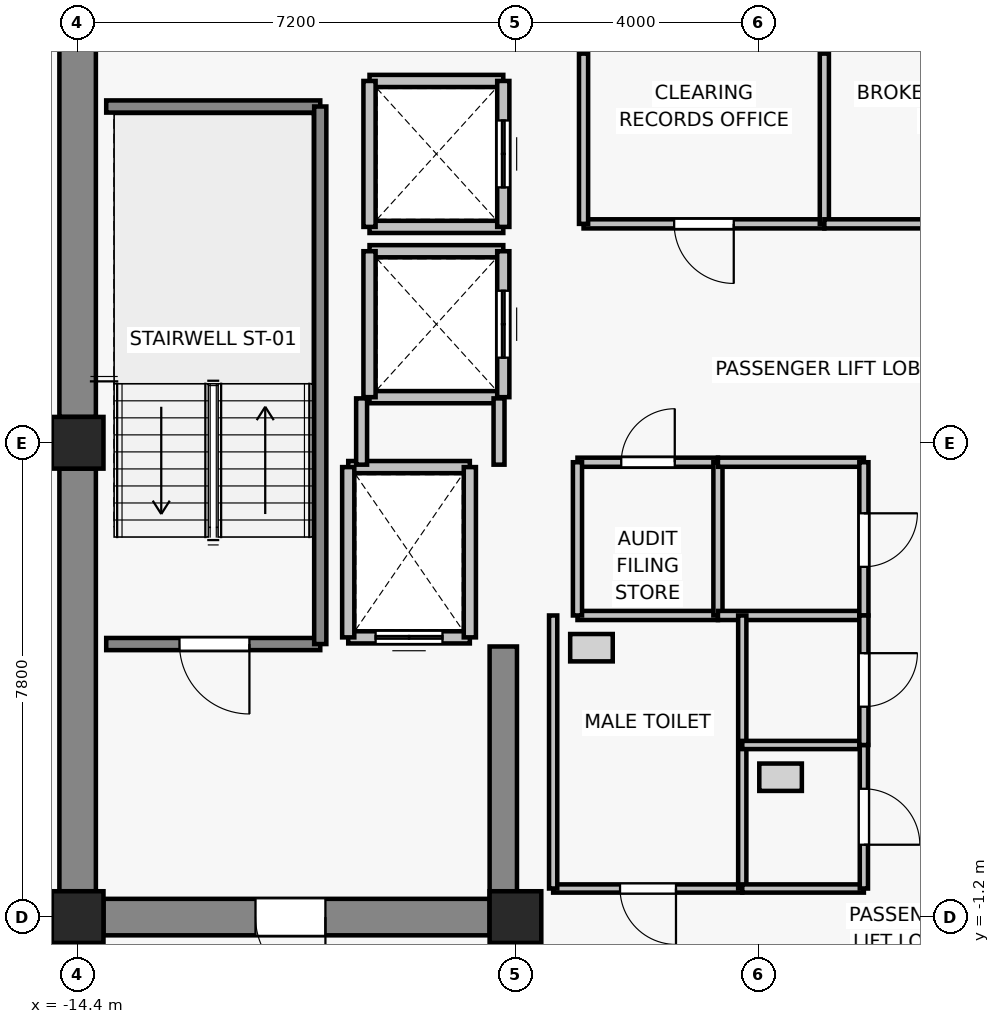
"""IFC4 building model, lengths in metres.
Left out: names, types, materials, properties, quantities, classifications, styles, units other than length and angle.
Written with IfcOpenShell. Run it as: python <this file> out.ifc"""

import sys

from ifc_helpers import new_model, si_unit, direction, frame, frame_2d, origin, origin_2d, place, context, subcontext, project, spatial, rectangle, extrude, source, transform, mapped, element, fill, save


model = new_model("IFC4")
c1 = context("Model", 3, precision=1e-05, world=origin(), true_north=direction((0.0, 1.0)))
c2 = subcontext(c1, "Body", "Model", "MODEL_VIEW")
j1 = project(units=[si_unit("LENGTHUNIT", "METRE"), si_unit("PLANEANGLEUNIT", "RADIAN")], contexts=[c1])
p1 = place(None, origin())
s1 = spatial("IfcSite", under=j1, at=p1, CompositionType="ELEMENT")
p2 = place(p1, origin())
s2 = spatial("IfcBuilding", under=s1, at=p2, CompositionType="ELEMENT")
p3 = place(p2, frame((0.0, 0.0, 222.1)))
s3 = spatial("IfcBuildingStorey", under=s2, at=p3, CompositionType="ELEMENT", Elevation=222.1)
for number, where, z_axis, x_axis in (
    (1, (-14.4, -1.2, 0.0), (0.0, 0.0, 1.0), (1.0, 0.0, 0.0)),
    (2, (-7.2, -1.2, 0.0), (0.0, 0.0, 1.0), (1.0, 0.0, 0.0)),
    (3, (-14.4, 6.6, 0.0), (0.0, 0.0, 1.0), (1.0, 0.0, 0.0)),
):
    element("IfcColumn", number, at=place(p3, frame(where, z_axis=z_axis, x_axis=x_axis)), inside=s3, PredefinedType="COLUMN", context=c2, shape_type="SweptSolid", body=[
        extrude(rectangle(XDim=0.85, YDim=0.85, at=origin_2d()), origin(), (0.0, 0.0, 1.0), 3.3),
    ])
p4 = place(p3, frame((-14.4, -0.775, 0.0), z_axis=(0.0, 0.0, 1.0), x_axis=(0.0, 1.0, 0.0)))
e4 = element("IfcWall", 4, at=p4, inside=s3, PredefinedType="SHEAR", context=c2, shape_type="SweptSolid", body=[
    extrude(rectangle(XDim=6.95, YDim=0.6, at=frame_2d((3.475, 0.0))), origin(), (0.0, 0.0, 1.0), 3.075),
])
p5 = place(p3, frame((-14.4, 7.025, 0.0), z_axis=(0.0, 0.0, 1.0), x_axis=(0.0, 1.0, 0.0)))
e5 = element("IfcWall", 5, at=p5, inside=s3, PredefinedType="SHEAR", context=c2, shape_type="SweptSolid", body=[
    extrude(rectangle(XDim=6.05, YDim=0.6, at=frame_2d((3.025, 0.0))), origin(), (0.0, 0.0, 1.0), 3.075),
])
p6 = place(p3, frame((-7.625, -1.2, 0.0), z_axis=(0.0, 0.0, 1.0), x_axis=(-1.0, 0.0, 0.0)))
e6 = element("IfcWall", 6, at=p6, inside=s3, PredefinedType="SHEAR", context=c2, shape_type="SweptSolid", body=[
    extrude(rectangle(XDim=6.35, YDim=0.6, at=frame_2d((3.175, 0.0))), origin(), (0.0, 0.0, 1.0), 3.075),
])
p7 = place(p6, frame((2.7, 0.0, 0.0)))
e7 = element("IfcOpeningElement", 7, at=p7, cuts=e6, PredefinedType="OPENING", context=c2, shape_type="SweptSolid", body=[
    extrude(rectangle(XDim=1.15, YDim=2.15, at=frame_2d((0.575, 1.075))), frame((0.0, 0.31, 0.0), z_axis=(0.0, -1.0, 0.0), x_axis=(1.0, 0.0, 0.0)), (0.0, 0.0, 1.0), 0.62),
])
p8 = place(p3, frame((-7.4, -0.9, 0.0), z_axis=(0.0, 0.0, 1.0), x_axis=(0.0, 1.0, 0.0)))
e8 = element("IfcWall", 8, at=p8, inside=s3, PredefinedType="SHEAR", context=c2, shape_type="SweptSolid", body=[
    extrude(rectangle(XDim=4.15, YDim=0.45, at=frame_2d((2.075, 0.0))), origin(), (0.0, 0.0, 1.0), 3.075),
])
p9 = place(p3, frame((-7.95, 3.4, 0.0), z_axis=(0.0, 0.0, 1.0), x_axis=(-1.0, 0.0, 0.0)))
e9 = element("IfcWall", 9, at=p9, inside=s3, PredefinedType="SOLIDWALL", context=c2, shape_type="SweptSolid", body=[
    extrude(rectangle(XDim=2.0, YDim=0.2, at=frame_2d((1.0, 0.0))), origin(), (0.0, 0.0, 1.0), 3.075),
])
p10 = place(p9, frame((0.45, 0.0, 0.0)))
e10 = element("IfcOpeningElement", 10, at=p10, cuts=e9, PredefinedType="OPENING", context=c2, shape_type="SweptSolid", body=[
    extrude(rectangle(XDim=1.1, YDim=2.2, at=frame_2d((0.55, 1.1))), frame((0.0, 0.11, 0.0), z_axis=(0.0, -1.0, 0.0), x_axis=(1.0, 0.0, 0.0)), (0.0, 0.0, 1.0), 0.22),
])
p11 = place(p3, frame((-9.95, 6.2, 0.0), z_axis=(0.0, 0.0, 1.0), x_axis=(1.0, 0.0, 0.0)))
e11 = element("IfcWall", 11, at=p11, inside=s3, PredefinedType="SOLIDWALL", context=c2, shape_type="SweptSolid", body=[
    extrude(rectangle(XDim=2.0, YDim=0.2, at=frame_2d((1.0, 0.0))), origin(), (0.0, 0.0, 1.0), 3.075),
])
for number, where, z_axis, x_axis in (
    (12, (-9.95, 3.4, 0.0), (0.0, 0.0, 1.0), (0.0, 1.0, 0.0)),
    (13, (-7.95, 6.2, 0.0), (0.0, 0.0, 1.0), (0.0, -1.0, 0.0)),
):
    element("IfcWall", number, at=place(p3, frame(where, z_axis=z_axis, x_axis=x_axis)), inside=s3, PredefinedType="SOLIDWALL", context=c2, shape_type="SweptSolid", body=[
        extrude(rectangle(XDim=2.8, YDim=0.2, at=frame_2d((1.4, 0.0))), origin(), (0.0, 0.0, 1.0), 3.075),
    ])
for number, where, z_axis, x_axis in (
    (14, (-7.4, 7.35, 0.0), (0.0, 0.0, 1.0), (-1.0, 0.0, 0.0)),
    (15, (-9.6, 9.75, 0.0), (0.0, 0.0, 1.0), (1.0, 0.0, 0.0)),
):
    element("IfcWall", number, at=place(p3, frame(where, z_axis=z_axis, x_axis=x_axis)), inside=s3, PredefinedType="SOLIDWALL", context=c2, shape_type="SweptSolid", body=[
        extrude(rectangle(XDim=2.2, YDim=0.2, at=frame_2d((1.1, 0.0))), origin(), (0.0, 0.0, 1.0), 2.615),
    ])
p12 = place(p3, frame((-9.6, 7.35, 0.0), z_axis=(0.0, 0.0, 1.0), x_axis=(0.0, 1.0, 0.0)))
e16 = element("IfcWall", 16, at=p12, inside=s3, PredefinedType="SOLIDWALL", context=c2, shape_type="SweptSolid", body=[
    extrude(rectangle(XDim=2.4, YDim=0.2, at=frame_2d((1.2, 0.0))), origin(), (0.0, 0.0, 1.0), 3.075),
])
p13 = place(p3, frame((-7.4, 9.75, 0.0), z_axis=(0.0, 0.0, 1.0), x_axis=(0.0, -1.0, 0.0)))
e17 = element("IfcWall", 17, at=p13, inside=s3, PredefinedType="SOLIDWALL", context=c2, shape_type="SweptSolid", body=[
    extrude(rectangle(XDim=2.4, YDim=0.2, at=frame_2d((1.2, 0.0))), origin(), (0.0, 0.0, 1.0), 2.615),
])
p14 = place(p13, frame((0.65, 0.0, 0.0)))
e18 = element("IfcOpeningElement", 18, at=p14, cuts=e17, PredefinedType="OPENING", context=c2, shape_type="SweptSolid", body=[
    extrude(rectangle(XDim=1.1, YDim=2.2, at=frame_2d((0.55, 1.1))), frame((0.0, 0.11, 0.0), z_axis=(0.0, -1.0, 0.0), x_axis=(1.0, 0.0, 0.0)), (0.0, 0.0, 1.0), 0.22),
])
for number, where, z_axis, x_axis in (
    (19, (-7.4, 10.15, 0.0), (0.0, 0.0, 1.0), (-1.0, 0.0, 0.0)),
    (20, (-9.6, 12.55, 0.0), (0.0, 0.0, 1.0), (1.0, 0.0, 0.0)),
):
    element("IfcWall", number, at=place(p3, frame(where, z_axis=z_axis, x_axis=x_axis)), inside=s3, PredefinedType="SOLIDWALL", context=c2, shape_type="SweptSolid", body=[
        extrude(rectangle(XDim=2.2, YDim=0.2, at=frame_2d((1.1, 0.0))), origin(), (0.0, 0.0, 1.0), 2.615),
    ])
p15 = place(p3, frame((-9.6, 10.15, 0.0), z_axis=(0.0, 0.0, 1.0), x_axis=(0.0, 1.0, 0.0)))
e21 = element("IfcWall", 21, at=p15, inside=s3, PredefinedType="SOLIDWALL", context=c2, shape_type="SweptSolid", body=[
    extrude(rectangle(XDim=2.4, YDim=0.2, at=frame_2d((1.2, 0.0))), origin(), (0.0, 0.0, 1.0), 3.075),
])
p16 = place(p3, frame((-7.4, 12.55, 0.0), z_axis=(0.0, 0.0, 1.0), x_axis=(0.0, -1.0, 0.0)))
e22 = element("IfcWall", 22, at=p16, inside=s3, PredefinedType="SOLIDWALL", context=c2, shape_type="SweptSolid", body=[
    extrude(rectangle(XDim=2.4, YDim=0.2, at=frame_2d((1.2, 0.0))), origin(), (0.0, 0.0, 1.0), 2.615),
])
p17 = place(p16, frame((0.65, 0.0, 0.0)))
e23 = element("IfcOpeningElement", 23, at=p17, cuts=e22, PredefinedType="OPENING", context=c2, shape_type="SweptSolid", body=[
    extrude(rectangle(XDim=1.1, YDim=2.2, at=frame_2d((0.55, 1.1))), frame((0.0, 0.11, 0.0), z_axis=(0.0, -1.0, 0.0), x_axis=(1.0, 0.0, 0.0)), (0.0, 0.0, 1.0), 0.22),
])
p18 = place(p3, frame((-10.41, 3.29, 0.0), z_axis=(0.0, 0.0, 1.0), x_axis=(-1.0, 0.0, 0.0)))
e24 = element("IfcWall", 24, at=p18, inside=s3, PredefinedType="SOLIDWALL", context=c2, shape_type="SweptSolid", body=[
    extrude(rectangle(XDim=3.52, YDim=0.2, at=frame_2d((1.76, 0.0))), origin(), (0.0, 0.0, 1.0), 3.075),
])
p19 = place(p18, frame((1.165, 0.0, 0.0)))
e25 = element("IfcOpeningElement", 25, at=p19, cuts=e24, PredefinedType="OPENING", context=c2, shape_type="SweptSolid", body=[
    extrude(rectangle(XDim=1.15, YDim=2.15, at=frame_2d((0.575, 1.075))), frame((0.0, 0.11, 0.0), z_axis=(0.0, -1.0, 0.0), x_axis=(1.0, 0.0, 0.0)), (0.0, 0.0, 1.0), 0.22),
])
p20 = place(p3, frame((-13.93, 12.13, 0.0), z_axis=(0.0, 0.0, 1.0), x_axis=(1.0, 0.0, 0.0)))
e26 = element("IfcWall", 26, at=p20, inside=s3, PredefinedType="SOLIDWALL", context=c2, shape_type="SweptSolid", body=[
    extrude(rectangle(XDim=3.52, YDim=0.2, at=frame_2d((1.76, 0.0))), origin(), (0.0, 0.0, 1.0), 3.075),
])
p21 = place(p3, frame((-10.41, 12.13, 0.0), z_axis=(0.0, 0.0, 1.0), x_axis=(0.0, -1.0, 0.0)))
e27 = element("IfcWall", 27, at=p21, inside=s3, PredefinedType="SOLIDWALL", context=c2, shape_type="SweptSolid", body=[
    extrude(rectangle(XDim=8.84, YDim=0.2, at=frame_2d((4.42, 0.0))), origin(), (0.0, 0.0, 1.0), 3.075),
])
p22 = place(p3, frame((-9.73, 6.24, 0.0), z_axis=(0.0, 0.0, 1.0), x_axis=(0.0, 1.0, 0.0)))
e28 = element("IfcWall", 28, at=p22, inside=s3, PredefinedType="PARTITIONING", context=c2, shape_type="SweptSolid", body=[
    extrude(rectangle(XDim=1.09, YDim=0.18, at=frame_2d((0.545, 0.0))), origin(), (0.0, 0.0, 1.0), 3.075),
])
p23 = place(p3, frame((-7.47, 7.33, 0.0), z_axis=(0.0, 0.0, 1.0), x_axis=(0.0, -1.0, 0.0)))
e29 = element("IfcWall", 29, at=p23, inside=s3, PredefinedType="PARTITIONING", context=c2, shape_type="SweptSolid", body=[
    extrude(rectangle(XDim=1.09, YDim=0.18, at=frame_2d((0.545, 0.0))), origin(), (0.0, 0.0, 1.0), 2.615),
])
p24 = place(p3, frame((-2.12, 10.2, 0.0), z_axis=(0.0, 0.0, 1.0), x_axis=(-1.0, 0.0, 0.0)))
e30 = element("IfcWall", 30, at=p24, inside=s3, PredefinedType="PARTITIONING", context=c2, shape_type="SweptSolid", body=[
    extrude(rectangle(XDim=3.96, YDim=0.15, at=frame_2d((1.98, 0.0))), origin(), (0.0, 0.0, 1.0), 3.075),
])
p25 = place(p24, frame((1.49, 0.0, 0.0)))
e31 = element("IfcOpeningElement", 31, at=p25, cuts=e30, PredefinedType="OPENING", context=c2, shape_type="SweptSolid", body=[
    extrude(rectangle(XDim=0.98, YDim=2.15, at=frame_2d((0.49, 1.075))), frame((0.0, 0.085, 0.0), z_axis=(0.0, -1.0, 0.0), x_axis=(1.0, 0.0, 0.0)), (0.0, 0.0, 1.0), 0.17),
])
for number, where, z_axis, x_axis in (
    (32, (-6.08, 10.2, 0.0), (0.0, 0.0, 1.0), (0.0, 1.0, 0.0)),
    (33, (-2.12, 13.0, 0.0), (0.0, 0.0, 1.0), (0.0, -1.0, 0.0)),
):
    element("IfcWall", number, at=place(p3, frame(where, z_axis=z_axis, x_axis=x_axis)), inside=s3, PredefinedType="PARTITIONING", context=c2, shape_type="SweptSolid", body=[
        extrude(rectangle(XDim=2.8, YDim=0.15, at=frame_2d((1.4, 0.0))), origin(), (0.0, 0.0, 1.0), 3.075),
    ])
p26 = place(p3, frame((2.04, 10.2, 0.0), z_axis=(0.0, 0.0, 1.0), x_axis=(-1.0, 0.0, 0.0)))
e34 = element("IfcWall", 34, at=p26, inside=s3, PredefinedType="PARTITIONING", context=c2, shape_type="SweptSolid", body=[
    extrude(rectangle(XDim=4.16, YDim=0.15, at=frame_2d((2.08, 0.0))), origin(), (0.0, 0.0, 1.0), 3.075),
])
p27 = place(p26, frame((1.55, 0.0, 0.0)))
e35 = element("IfcOpeningElement", 35, at=p27, cuts=e34, PredefinedType="OPENING", context=c2, shape_type="SweptSolid", body=[
    extrude(rectangle(XDim=0.98, YDim=2.15, at=frame_2d((0.49, 1.075))), frame((0.0, 0.085, 0.0), z_axis=(0.0, -1.0, 0.0), x_axis=(1.0, 0.0, 0.0)), (0.0, 0.0, 1.0), 0.17),
])
p28 = place(p3, frame((-3.87, 3.76, 0.0), z_axis=(0.0, 0.0, 1.0), x_axis=(-1.0, 0.0, 0.0)))
e36 = element("IfcWall", 36, at=p28, inside=s3, PredefinedType="PARTITIONING", context=c2, shape_type="SweptSolid", body=[
    extrude(rectangle(XDim=2.31, YDim=0.15, at=frame_2d((1.155, 0.0))), origin(), (0.0, 0.0, 1.0), 3.075),
])
p29 = place(p3, frame((-6.18, 6.28, 0.0), z_axis=(0.0, 0.0, 1.0), x_axis=(1.0, 0.0, 0.0)))
e37 = element("IfcWall", 37, at=p29, inside=s3, PredefinedType="PARTITIONING", context=c2, shape_type="SweptSolid", body=[
    extrude(rectangle(XDim=2.31, YDim=0.15, at=frame_2d((1.155, 0.0))), origin(), (0.0, 0.0, 1.0), 3.075),
])
p30 = place(p29, frame((0.72, 0.0, 0.0)))
e38 = element("IfcOpeningElement", 38, at=p30, cuts=e37, PredefinedType="OPENING", context=c2, shape_type="SweptSolid", body=[
    extrude(rectangle(XDim=0.88, YDim=2.1, at=frame_2d((0.44, 1.05))), frame((0.0, 0.085, 0.0), z_axis=(0.0, -1.0, 0.0), x_axis=(1.0, 0.0, 0.0)), (0.0, 0.0, 1.0), 0.17),
])
for number, where, z_axis, x_axis in (
    (39, (-6.18, 3.76, 0.0), (0.0, 0.0, 1.0), (0.0, 1.0, 0.0)),
    (40, (-3.87, 6.28, 0.0), (0.0, 0.0, 1.0), (0.0, -1.0, 0.0)),
):
    element("IfcWall", number, at=place(p3, frame(where, z_axis=z_axis, x_axis=x_axis)), inside=s3, PredefinedType="PARTITIONING", context=c2, shape_type="SweptSolid", body=[
        extrude(rectangle(XDim=2.52, YDim=0.15, at=frame_2d((1.26, 0.0))), origin(), (0.0, 0.0, 1.0), 3.075),
    ])
for number, where, z_axis, x_axis in (
    (41, (-1.47, 3.76, 0.0), (0.0, 0.0, 1.0), (-1.0, 0.0, 0.0)),
    (42, (-3.87, 6.28, 0.0), (0.0, 0.0, 1.0), (1.0, 0.0, 0.0)),
):
    element("IfcWall", number, at=place(p3, frame(where, z_axis=z_axis, x_axis=x_axis)), inside=s3, PredefinedType="PARTITIONING", context=c2, shape_type="SweptSolid", body=[
        extrude(rectangle(XDim=2.4, YDim=0.15, at=frame_2d((1.2, 0.0))), origin(), (0.0, 0.0, 1.0), 3.075),
    ])
p31 = place(p3, frame((-1.47, 6.28, 0.0), z_axis=(0.0, 0.0, 1.0), x_axis=(0.0, -1.0, 0.0)))
e43 = element("IfcWall", 43, at=p31, inside=s3, PredefinedType="PARTITIONING", context=c2, shape_type="SweptSolid", body=[
    extrude(rectangle(XDim=2.52, YDim=0.15, at=frame_2d((1.26, 0.0))), origin(), (0.0, 0.0, 1.0), 3.075),
])
p32 = place(p31, frame((0.84, 0.0, 0.0)))
e44 = element("IfcOpeningElement", 44, at=p32, cuts=e43, PredefinedType="OPENING", context=c2, shape_type="SweptSolid", body=[
    extrude(rectangle(XDim=0.88, YDim=2.1, at=frame_2d((0.44, 1.05))), frame((0.0, 0.085, 0.0), z_axis=(0.0, -1.0, 0.0), x_axis=(1.0, 0.0, 0.0)), (0.0, 0.0, 1.0), 0.17),
])
p33 = place(p3, frame((-3.47, -0.73, 0.0), z_axis=(0.0, 0.0, 1.0), x_axis=(-1.0, 0.0, 0.0)))
e45 = element("IfcWall", 45, at=p33, inside=s3, PredefinedType="PARTITIONING", context=c2, shape_type="SweptSolid", body=[
    extrude(rectangle(XDim=3.11, YDim=0.135, at=frame_2d((1.555, 0.0))), origin(), (0.0, 0.0, 1.0), 3.075),
])
p34 = place(p33, frame((1.09, 0.0, 0.0)))
e46 = element("IfcOpeningElement", 46, at=p34, cuts=e45, PredefinedType="OPENING", context=c2, shape_type="SweptSolid", body=[
    extrude(rectangle(XDim=0.92, YDim=2.1, at=frame_2d((0.46, 1.05))), frame((0.0, 0.077, 0.0), z_axis=(0.0, -1.0, 0.0), x_axis=(1.0, 0.0, 0.0)), (0.0, 0.0, 1.0), 0.155),
])
for number, where, z_axis, x_axis in (
    (47, (-6.58, -0.73, 0.0), (0.0, 0.0, 1.0), (0.0, 1.0, 0.0)),
    (48, (-3.47, 3.76, 0.0), (0.0, 0.0, 1.0), (0.0, -1.0, 0.0)),
):
    element("IfcWall", number, at=place(p3, frame(where, z_axis=z_axis, x_axis=x_axis)), inside=s3, PredefinedType="PARTITIONING", context=c2, shape_type="SweptSolid", body=[
        extrude(rectangle(XDim=4.49, YDim=0.135, at=frame_2d((2.245, 0.0))), origin(), (0.0, 0.0, 1.0), 3.075),
    ])
for number, where, z_axis, x_axis in (
    (49, (-1.47, -0.73, 0.0), (0.0, 0.0, 1.0), (-1.0, 0.0, 0.0)),
    (50, (-3.47, 1.63, 0.0), (0.0, 0.0, 1.0), (1.0, 0.0, 0.0)),
):
    element("IfcWall", number, at=place(p3, frame(where, z_axis=z_axis, x_axis=x_axis)), inside=s3, PredefinedType="PARTITIONING", context=c2, shape_type="SweptSolid", body=[
        extrude(rectangle(XDim=2.0, YDim=0.135, at=frame_2d((1.0, 0.0))), origin(), (0.0, 0.0, 1.0), 3.075),
    ])
p35 = place(p3, frame((-1.47, 1.63, 0.0), z_axis=(0.0, 0.0, 1.0), x_axis=(0.0, -1.0, 0.0)))
e51 = element("IfcWall", 51, at=p35, inside=s3, PredefinedType="PARTITIONING", context=c2, shape_type="SweptSolid", body=[
    extrude(rectangle(XDim=2.36, YDim=0.135, at=frame_2d((1.18, 0.0))), origin(), (0.0, 0.0, 1.0), 3.075),
])
p36 = place(p35, frame((0.72, 0.0, 0.0)))
e52 = element("IfcOpeningElement", 52, at=p36, cuts=e51, PredefinedType="OPENING", context=c2, shape_type="SweptSolid", body=[
    extrude(rectangle(XDim=0.92, YDim=2.1, at=frame_2d((0.46, 1.05))), frame((0.0, 0.077, 0.0), z_axis=(0.0, -1.0, 0.0), x_axis=(1.0, 0.0, 0.0)), (0.0, 0.0, 1.0), 0.155),
])
p37 = place(p3, frame((-1.47, 3.76, 0.0), z_axis=(0.0, 0.0, 1.0), x_axis=(0.0, -1.0, 0.0)))
e53 = element("IfcWall", 53, at=p37, inside=s3, PredefinedType="PARTITIONING", context=c2, shape_type="SweptSolid", body=[
    extrude(rectangle(XDim=2.13, YDim=0.15, at=frame_2d((1.065, 0.0))), origin(), (0.0, 0.0, 1.0), 3.075),
])
p38 = place(p37, frame((0.62, 0.0, 0.0)))
e54 = element("IfcOpeningElement", 54, at=p38, cuts=e53, PredefinedType="OPENING", context=c2, shape_type="SweptSolid", body=[
    extrude(rectangle(XDim=0.88, YDim=2.1, at=frame_2d((0.44, 1.05))), frame((0.0, 0.085, 0.0), z_axis=(0.0, -1.0, 0.0), x_axis=(1.0, 0.0, 0.0)), (0.0, 0.0, 1.0), 0.17),
])
m1 = source(origin(), c2, "Body", "SweptSolid", [
    extrude(rectangle(XDim=1.1, YDim=2.2, at=frame_2d((0.55, 1.1))), frame((0.0, 0.025, 0.0), z_axis=(0.0, -1.0, 0.0), x_axis=(1.0, 0.0, 0.0)), (0.0, 0.0, 1.0), 0.05),
])
p39 = place(p10, origin())
e55 = element("IfcDoor", 55, at=p39, inside=s3, OperationType="DOUBLE_DOOR_SLIDING", PredefinedType="DOOR", context=c2, shape_type="MappedRepresentation", body=[
    mapped(m1, transform((0.0, 0.0, 0.0), x_axis=(1.0, 0.0, 0.0), y_axis=(0.0, 1.0, 0.0), z_axis=(0.0, 0.0, 1.0), scale=1.0)),
])
fill(e10, e55)
p40 = place(p14, origin())
e56 = element("IfcDoor", 56, at=p40, inside=s3, OperationType="DOUBLE_DOOR_SLIDING", PredefinedType="DOOR", context=c2, shape_type="MappedRepresentation", body=[
    mapped(m1, transform((0.0, 0.0, 0.0), x_axis=(1.0, 0.0, 0.0), y_axis=(0.0, 1.0, 0.0), z_axis=(0.0, 0.0, 1.0), scale=1.0)),
])
fill(e18, e56)
p41 = place(p17, origin())
e57 = element("IfcDoor", 57, at=p41, inside=s3, OperationType="DOUBLE_DOOR_SLIDING", PredefinedType="DOOR", context=c2, shape_type="MappedRepresentation", body=[
    mapped(m1, transform((0.0, 0.0, 0.0), x_axis=(1.0, 0.0, 0.0), y_axis=(0.0, 1.0, 0.0), z_axis=(0.0, 0.0, 1.0), scale=1.0)),
])
fill(e23, e57)
m2 = source(origin(), c2, "Body", "SweptSolid", [
    extrude(rectangle(XDim=1.15, YDim=2.15, at=frame_2d((0.575, 1.075))), frame((0.0, 0.025, 0.0), z_axis=(0.0, -1.0, 0.0), x_axis=(1.0, 0.0, 0.0)), (0.0, 0.0, 1.0), 0.05),
])
p42 = place(p19, origin())
e58 = element("IfcDoor", 58, at=p42, inside=s3, OperationType="SINGLE_SWING_LEFT", PredefinedType="DOOR", context=c2, shape_type="MappedRepresentation", body=[
    mapped(m2, transform((0.0, 0.0, 0.0), x_axis=(1.0, 0.0, 0.0), y_axis=(0.0, 1.0, 0.0), z_axis=(0.0, 0.0, 1.0), scale=1.0)),
])
fill(e25, e58)
p43 = place(p7, origin())
e59 = element("IfcDoor", 59, at=p43, inside=s3, OperationType="SINGLE_SWING_LEFT", PredefinedType="DOOR", context=c2, shape_type="MappedRepresentation", body=[
    mapped(m2, transform((0.0, 0.0, 0.0), x_axis=(1.0, 0.0, 0.0), y_axis=(0.0, 1.0, 0.0), z_axis=(0.0, 0.0, 1.0), scale=1.0)),
])
fill(e7, e59)
m3 = source(origin(), c2, "Body", "SweptSolid", [
    extrude(rectangle(XDim=0.98, YDim=2.15, at=frame_2d((0.49, 1.075))), frame((0.0, 0.025, 0.0), z_axis=(0.0, -1.0, 0.0), x_axis=(1.0, 0.0, 0.0)), (0.0, 0.0, 1.0), 0.05),
])
p44 = place(p25, origin())
e60 = element("IfcDoor", 60, at=p44, inside=s3, OperationType="SINGLE_SWING_LEFT", PredefinedType="DOOR", context=c2, shape_type="MappedRepresentation", body=[
    mapped(m3, transform((0.0, 0.0, 0.0), x_axis=(1.0, 0.0, 0.0), y_axis=(0.0, 1.0, 0.0), z_axis=(0.0, 0.0, 1.0), scale=1.0)),
])
fill(e31, e60)
m4 = source(origin(), c2, "Body", "SweptSolid", [
    extrude(rectangle(XDim=0.88, YDim=2.1, at=frame_2d((0.44, 1.05))), frame((0.0, 0.025, 0.0), z_axis=(0.0, -1.0, 0.0), x_axis=(1.0, 0.0, 0.0)), (0.0, 0.0, 1.0), 0.05),
])
p45 = place(p30, origin())
e61 = element("IfcDoor", 61, at=p45, inside=s3, OperationType="SINGLE_SWING_RIGHT", PredefinedType="DOOR", context=c2, shape_type="MappedRepresentation", body=[
    mapped(m4, transform((0.0, 0.0, 0.0), x_axis=(1.0, 0.0, 0.0), y_axis=(0.0, 1.0, 0.0), z_axis=(0.0, 0.0, 1.0), scale=1.0)),
])
fill(e38, e61)
p46 = place(p32, origin())
e62 = element("IfcDoor", 62, at=p46, inside=s3, OperationType="SINGLE_SWING_LEFT", PredefinedType="DOOR", context=c2, shape_type="MappedRepresentation", body=[
    mapped(m4, transform((0.0, 0.0, 0.0), x_axis=(1.0, 0.0, 0.0), y_axis=(0.0, 1.0, 0.0), z_axis=(0.0, 0.0, 1.0), scale=1.0)),
])
fill(e44, e62)
m5 = source(origin(), c2, "Body", "SweptSolid", [
    extrude(rectangle(XDim=0.92, YDim=2.1, at=frame_2d((0.46, 1.05))), frame((0.0, 0.025, 0.0), z_axis=(0.0, -1.0, 0.0), x_axis=(1.0, 0.0, 0.0)), (0.0, 0.0, 1.0), 0.05),
])
p47 = place(p34, origin())
e63 = element("IfcDoor", 63, at=p47, inside=s3, OperationType="SINGLE_SWING_LEFT", PredefinedType="DOOR", context=c2, shape_type="MappedRepresentation", body=[
    mapped(m5, transform((0.0, 0.0, 0.0), x_axis=(1.0, 0.0, 0.0), y_axis=(0.0, 1.0, 0.0), z_axis=(0.0, 0.0, 1.0), scale=1.0)),
])
fill(e46, e63)
p48 = place(p36, origin())
e64 = element("IfcDoor", 64, at=p48, inside=s3, OperationType="SINGLE_SWING_RIGHT", PredefinedType="DOOR", context=c2, shape_type="MappedRepresentation", body=[
    mapped(m5, transform((0.0, 0.0, 0.0), x_axis=(1.0, 0.0, 0.0), y_axis=(0.0, 1.0, 0.0), z_axis=(0.0, 0.0, 1.0), scale=1.0)),
])
fill(e52, e64)
p49 = place(p38, origin())
e65 = element("IfcDoor", 65, at=p49, inside=s3, OperationType="SINGLE_SWING_LEFT", PredefinedType="DOOR", context=c2, shape_type="MappedRepresentation", body=[
    mapped(m4, transform((0.0, 0.0, 0.0), x_axis=(1.0, 0.0, 0.0), y_axis=(0.0, 1.0, 0.0), z_axis=(0.0, 0.0, 1.0), scale=1.0)),
])
fill(e54, e65)
save(model, sys.argv[1])
